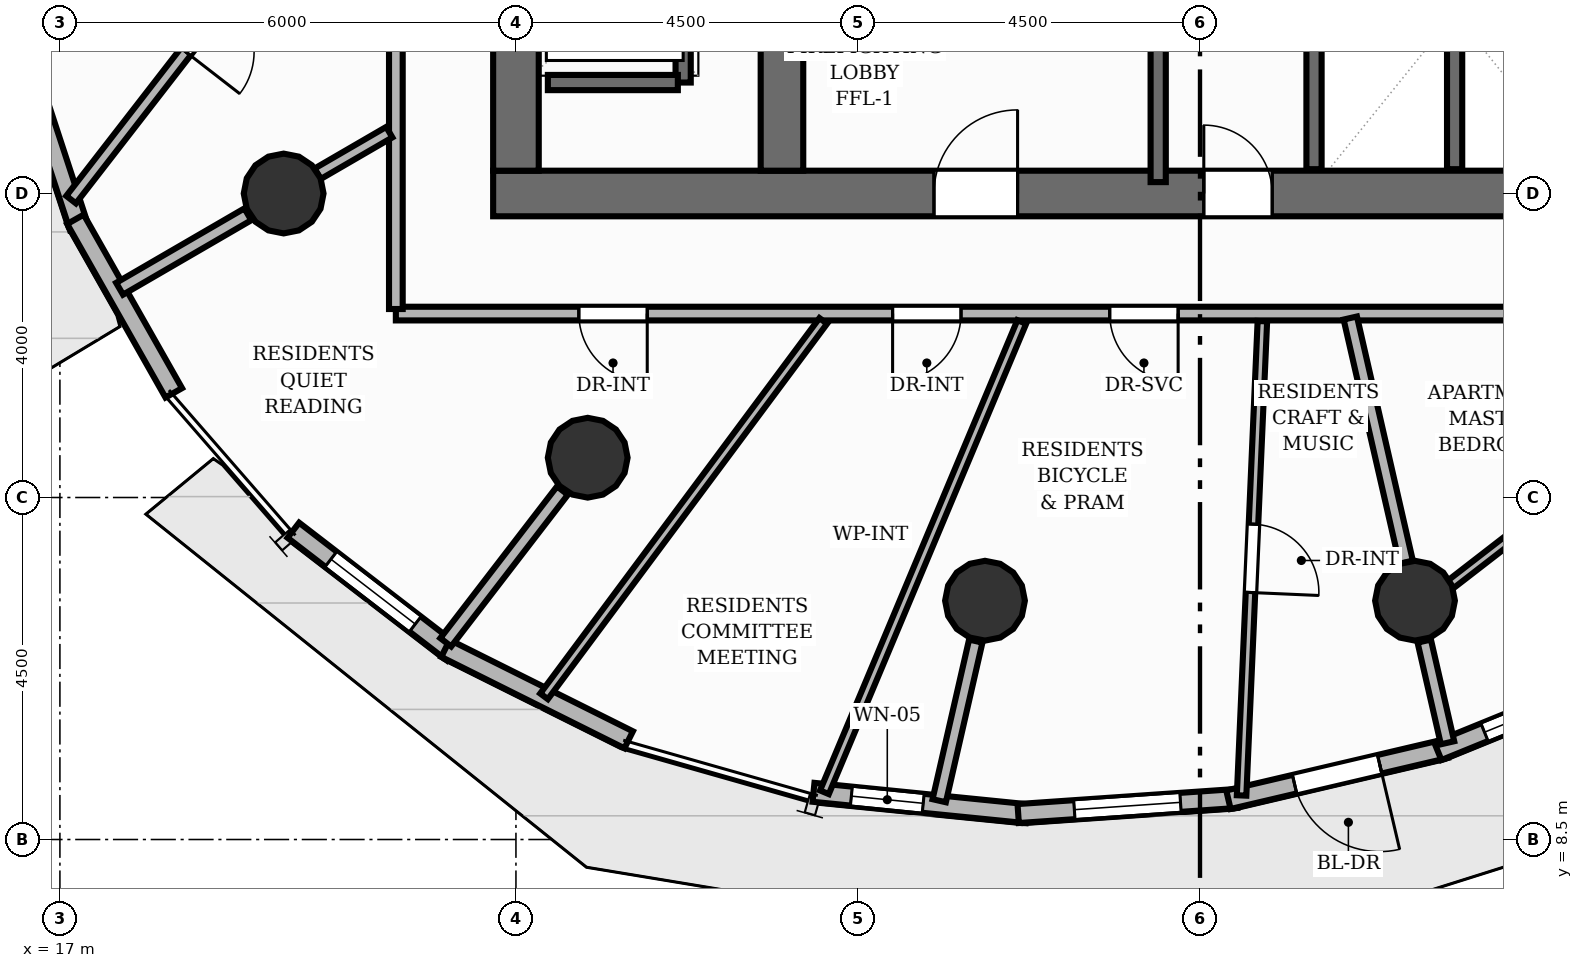
"""IFC4 building model, lengths in metres.
Left out: names, types, materials, properties, quantities, classifications, styles, units other than length and angle.
Written with IfcOpenShell. Run it as: python <this file> out.ifc"""

import sys

from ifc_helpers import new_model, si_unit, direction, frame, frame_2d, origin, origin_2d, place, context, subcontext, project, spatial, rectangle, circle, extrude, element, fill, save


model = new_model("IFC4")
c1 = context("Model", 3, precision=1e-05, world=origin(), true_north=direction((0.0, 1.0)))
c2 = subcontext(c1, "Body", "Model", "MODEL_VIEW")
j1 = project(units=[si_unit("LENGTHUNIT", "METRE"), si_unit("PLANEANGLEUNIT", "RADIAN")], contexts=[c1])
p1 = place(None, origin())
s1 = spatial("IfcSite", under=j1, at=p1, CompositionType="ELEMENT")
p2 = place(p1, origin())
s2 = spatial("IfcBuilding", under=s1, at=p2, CompositionType="ELEMENT")
p3 = place(p2, frame((0.0, 0.0, 145.76)))
s3 = spatial("IfcBuildingStorey", under=s2, at=p3, CompositionType="ELEMENT", Elevation=145.76)
p4 = place(p3, frame((22.7, 17.0, 0.0), z_axis=(0.0, 0.0, 1.0), x_axis=(1.0, 0.0, 0.0)))
e1 = element("IfcWall", 1, at=p4, inside=s3, PredefinedType="SHEAR", context=c2, shape_type="SweptSolid", body=[
    extrude(rectangle(XDim=15.1, YDim=0.6, at=frame_2d((7.55, 0.0))), origin(), (0.0, 0.0, 1.0), 3.2),
])
p5 = place(p4, frame((5.8, 0.0, 0.0)))
e2 = element("IfcOpeningElement", 2, at=p5, cuts=e1, PredefinedType="OPENING", context=c2, shape_type="SweptSolid", body=[
    extrude(rectangle(XDim=1.1, YDim=2.15, at=frame_2d((0.55, 1.075))), frame((0.0, 0.31, 0.0), z_axis=(0.0, -1.0, 0.0), x_axis=(1.0, 0.0, 0.0)), (0.0, 0.0, 1.0), 0.62),
])
p6 = place(p4, frame((9.35, 0.0, 0.0)))
e3 = element("IfcOpeningElement", 3, at=p6, cuts=e1, PredefinedType="OPENING", context=c2, shape_type="SweptSolid", body=[
    extrude(rectangle(XDim=0.9, YDim=2.1, at=frame_2d((0.45, 1.05))), frame((0.0, 0.31, 0.0), z_axis=(0.0, -1.0, 0.0), x_axis=(1.0, 0.0, 0.0)), (0.0, 0.0, 1.0), 0.62),
])
p7 = place(p3, frame((23.0, 17.3, 0.0), z_axis=(0.0, 0.0, 1.0), x_axis=(0.0, 1.0, 0.0)))
e4 = element("IfcWall", 4, at=p7, inside=s3, PredefinedType="SHEAR", context=c2, shape_type="SweptSolid", body=[
    extrude(rectangle(XDim=13.4, YDim=0.6, at=frame_2d((6.7, 0.0))), origin(), (0.0, 0.0, 1.0), 3.2),
])
p8 = place(p7, frame((1.675, 0.0, 0.0)))
e5 = element("IfcOpeningElement", 5, at=p8, cuts=e4, PredefinedType="OPENING", context=c2, shape_type="SweptSolid", body=[
    extrude(rectangle(XDim=1.05, YDim=2.15, at=frame_2d((0.525, 1.075))), frame((0.0, 0.31, 0.0), z_axis=(0.0, -1.0, 0.0), x_axis=(1.0, 0.0, 0.0)), (0.0, 0.0, 1.0), 0.62),
])
p9 = place(p7, frame((6.175, 0.0, 0.0)))
e6 = element("IfcOpeningElement", 6, at=p9, cuts=e4, PredefinedType="OPENING", context=c2, shape_type="SweptSolid", body=[
    extrude(rectangle(XDim=1.05, YDim=2.15, at=frame_2d((0.525, 1.075))), frame((0.0, 0.31, 0.0), z_axis=(0.0, -1.0, 0.0), x_axis=(1.0, 0.0, 0.0)), (0.0, 0.0, 1.0), 0.62),
])
p10 = place(p7, frame((10.675, 0.0, 0.0)))
e7 = element("IfcOpeningElement", 7, at=p10, cuts=e4, PredefinedType="OPENING", context=c2, shape_type="SweptSolid", body=[
    extrude(rectangle(XDim=1.05, YDim=2.15, at=frame_2d((0.525, 1.075))), frame((0.0, 0.31, 0.0), z_axis=(0.0, -1.0, 0.0), x_axis=(1.0, 0.0, 0.0)), (0.0, 0.0, 1.0), 0.62),
])
p11 = place(p3, frame((26.5, 17.3, 0.0), z_axis=(0.0, 0.0, 1.0), x_axis=(0.0, 1.0, 0.0)))
e8 = element("IfcWall", 8, at=p11, inside=s3, PredefinedType="SHEAR", context=c2, shape_type="SweptSolid", body=[
    extrude(rectangle(XDim=13.4, YDim=0.56, at=frame_2d((6.7, 0.0))), origin(), (0.0, 0.0, 1.0), 3.2),
])
for number, where, z_axis, x_axis in (
    (9, (19.944, 17.0, 0.0), (0.0, 0.0, 1.0), (1.0, 0.0, 0.0)),
    (10, (23.944, 13.523, 0.0), (0.0, 0.0, 1.0), (1.0, 0.0, 0.0)),
    (11, (29.171, 11.642, 0.0), (0.0, 0.0, 1.0), (1.0, 0.0, 0.0)),
    (12, (34.829, 11.642, 0.0), (0.0, 0.0, 1.0), (1.0, 0.0, 0.0)),
):
    element("IfcColumn", number, at=place(p3, frame(where, z_axis=z_axis, x_axis=x_axis)), inside=s3, PredefinedType="COLUMN", context=c2, shape_type="SweptSolid", body=[
        extrude(circle(Radius=0.525, at=origin_2d()), origin(), (0.0, 0.0, 1.0), 3.2),
    ])
p12 = place(p3, frame((17.251, 16.556, 0.0), z_axis=(0.0, 0.0, 1.0), x_axis=(-0.311522010952, 0.950238936633, 0.0)))
e13 = element("IfcWall", 13, at=p12, inside=s3, PredefinedType="SOLIDWALL", context=c2, shape_type="SweptSolid", body=[
    extrude(rectangle(XDim=2.648, YDim=0.25, at=frame_2d((1.324, 0.0))), origin(), (0.0, 0.0, 1.0), 2.96),
])
p13 = place(p3, frame((18.498, 14.377, 0.0), z_axis=(0.0, 0.0, 1.0), x_axis=(-0.492909281161, 0.870080709214, 0.0)))
e14 = element("IfcWall", 14, at=p13, inside=s3, PredefinedType="SOLIDWALL", context=c2, shape_type="SweptSolid", body=[
    extrude(rectangle(XDim=2.624, YDim=0.25, at=frame_2d((1.312, 0.0))), origin(), (0.0, 0.0, 1.0), 2.96),
])
p14 = place(p3, frame((22.169, 10.954, 0.0), z_axis=(0.0, 0.0, 1.0), x_axis=(-0.7923805969, 0.610027040103, 0.0)))
e15 = element("IfcWall", 15, at=p14, inside=s3, PredefinedType="SOLIDWALL", context=c2, shape_type="SweptSolid", body=[
    extrude(rectangle(XDim=2.648, YDim=0.25, at=frame_2d((1.324, 0.0))), origin(), (0.0, 0.0, 1.0), 2.96),
])
p15 = place(p14, frame((0.624, 0.0, 0.85)))
e16 = element("IfcOpeningElement", 16, at=p15, cuts=e15, PredefinedType="OPENING", context=c2, shape_type="SweptSolid", body=[
    extrude(rectangle(XDim=1.4, YDim=1.55, at=frame_2d((0.7, 0.775))), frame((0.0, 0.135, 0.0), z_axis=(0.0, -1.0, 0.0), x_axis=(1.0, 0.0, 0.0)), (0.0, 0.0, 1.0), 0.27),
])
p16 = place(p3, frame((24.483, 9.812, 0.0), z_axis=(0.0, 0.0, 1.0), x_axis=(-0.894843809708, 0.446379385979, 0.0)))
e17 = element("IfcWall", 17, at=p16, inside=s3, PredefinedType="SOLIDWALL", context=c2, shape_type="SweptSolid", body=[
    extrude(rectangle(XDim=2.693, YDim=0.25, at=frame_2d((1.347, 0.0))), origin(), (0.0, 0.0, 1.0), 2.96),
])
p17 = place(p3, frame((29.719, 8.84, 0.0), z_axis=(0.0, 0.0, 1.0), x_axis=(-0.995013999105, 0.099735357744, 0.0)))
e18 = element("IfcWall", 18, at=p17, inside=s3, PredefinedType="SOLIDWALL", context=c2, shape_type="SweptSolid", body=[
    extrude(rectangle(XDim=2.818, YDim=0.25, at=frame_2d((1.409, 0.0))), origin(), (0.0, 0.0, 1.0), 2.96),
])
p18 = place(p17, frame((1.367, 0.0, 0.85)))
e19 = element("IfcOpeningElement", 19, at=p18, cuts=e18, PredefinedType="OPENING", context=c2, shape_type="SweptSolid", body=[
    extrude(rectangle(XDim=0.95, YDim=1.45, at=frame_2d((0.475, 0.725))), frame((0.0, 0.135, 0.0), z_axis=(0.0, -1.0, 0.0), x_axis=(1.0, 0.0, 0.0)), (0.0, 0.0, 1.0), 0.27),
])
p19 = place(p3, frame((32.483, 9.04, 0.0), z_axis=(0.0, 0.0, 1.0), x_axis=(-0.997630729469, -0.068796276206, 0.0)))
e20 = element("IfcWall", 20, at=p19, inside=s3, PredefinedType="SOLIDWALL", context=c2, shape_type="SweptSolid", body=[
    extrude(rectangle(XDim=2.882, YDim=0.25, at=frame_2d((1.441, 0.0))), origin(), (0.0, 0.0, 1.0), 2.96),
])
p20 = place(p19, frame((0.741, 0.0, 0.85)))
e21 = element("IfcOpeningElement", 21, at=p20, cuts=e20, PredefinedType="OPENING", context=c2, shape_type="SweptSolid", body=[
    extrude(rectangle(XDim=1.4, YDim=1.55, at=frame_2d((0.7, 0.775))), frame((0.0, 0.135, 0.0), z_axis=(0.0, -1.0, 0.0), x_axis=(1.0, 0.0, 0.0)), (0.0, 0.0, 1.0), 0.27),
])
p21 = place(p3, frame((35.233, 9.695, 0.0), z_axis=(0.0, 0.0, 1.0), x_axis=(-0.973538048261, -0.228524984602, 0.0)))
e22 = element("IfcWall", 22, at=p21, inside=s3, PredefinedType="SOLIDWALL", context=c2, shape_type="SweptSolid", body=[
    extrude(rectangle(XDim=2.937, YDim=0.25, at=frame_2d((1.468, 0.0))), origin(), (0.0, 0.0, 1.0), 2.96),
])
p22 = place(p21, frame((0.893, 0.0, 0.0)))
e23 = element("IfcOpeningElement", 23, at=p22, cuts=e22, PredefinedType="OPENING", context=c2, shape_type="SweptSolid", body=[
    extrude(rectangle(XDim=1.15, YDim=2.2, at=frame_2d((0.575, 1.1))), frame((0.0, 0.135, 0.0), z_axis=(0.0, -1.0, 0.0), x_axis=(1.0, 0.0, 0.0)), (0.0, 0.0, 1.0), 0.27),
])
p23 = place(p3, frame((37.886, 10.785, 0.0), z_axis=(0.0, 0.0, 1.0), x_axis=(-0.926076439021, -0.377335963154, 0.0)))
e24 = element("IfcWall", 24, at=p23, inside=s3, PredefinedType="SOLIDWALL", context=c2, shape_type="SweptSolid", body=[
    extrude(rectangle(XDim=2.977, YDim=0.25, at=frame_2d((1.488, 0.0))), origin(), (0.0, 0.0, 1.0), 2.96),
])
p24 = place(p23, frame((0.664, 0.0, 0.85)))
e25 = element("IfcOpeningElement", 25, at=p24, cuts=e24, PredefinedType="OPENING", context=c2, shape_type="SweptSolid", body=[
    extrude(rectangle(XDim=1.65, YDim=1.55, at=frame_2d((0.825, 0.775))), frame((0.0, 0.135, 0.0), z_axis=(0.0, -1.0, 0.0), x_axis=(1.0, 0.0, 0.0)), (0.0, 0.0, 1.0), 0.27),
])
p25 = place(p3, frame((31.45, 17.15, 0.0), z_axis=(0.0, 0.0, 1.0), x_axis=(0.0, 1.0, 0.0)))
e26 = element("IfcWall", 26, at=p25, inside=s3, PredefinedType="SHEAR", context=c2, shape_type="SweptSolid", body=[
    extrude(rectangle(XDim=3.5, YDim=0.2, at=frame_2d((1.75, 0.0))), origin(), (0.0, 0.0, 1.0), 3.2),
])
p26 = place(p3, frame((25.2, 18.46, 0.0), z_axis=(0.0, 0.0, 1.0), x_axis=(0.0, 1.0, 0.0)))
e27 = element("IfcWall", 27, at=p26, inside=s3, PredefinedType="SHEAR", context=c2, shape_type="SweptSolid", body=[
    extrude(rectangle(XDim=11.08, YDim=0.2, at=frame_2d((5.54, 0.0))), origin(), (0.0, 0.0, 1.0), 3.2),
])
p27 = place(p3, frame((23.42, 18.46, 0.0), z_axis=(0.0, 0.0, 1.0), x_axis=(1.0, 0.0, 0.0)))
e28 = element("IfcWall", 28, at=p27, inside=s3, PredefinedType="SHEAR", context=c2, shape_type="SweptSolid", body=[
    extrude(rectangle(XDim=1.71, YDim=0.2, at=frame_2d((0.855, 0.0))), origin(), (0.0, 0.0, 1.0), 3.2),
])
for number, where, z_axis, x_axis in (
    (29, (33.5, 17.32, 0.0), (0.0, 0.0, 1.0), (0.0, 1.0, 0.0)),
    (30, (35.35, 17.32, 0.0), (0.0, 0.0, 1.0), (0.0, 1.0, 0.0)),
):
    element("IfcWall", number, at=place(p3, frame(where, z_axis=z_axis, x_axis=x_axis)), inside=s3, PredefinedType="SHEAR", context=c2, shape_type="SweptSolid", body=[
        extrude(rectangle(XDim=1.86, YDim=0.2, at=frame_2d((0.93, 0.0))), origin(), (0.0, 0.0, 1.0), 3.2),
    ])
p28 = place(p3, frame((19.472, 16.726, 0.0), z_axis=(0.0, 0.0, 1.0), x_axis=(-0.864802971131, -0.502111363268, 0.0)))
e31 = element("IfcWall", 31, at=p28, inside=s3, PredefinedType="PARTITIONING", context=c2, shape_type="SweptSolid", body=[
    extrude(rectangle(XDim=1.951, YDim=0.18, at=frame_2d((0.975, 0.0))), origin(), (0.0, 0.0, 1.0), 2.336),
])
p29 = place(p3, frame((23.612, 13.092, 0.0), z_axis=(0.0, 0.0, 1.0), x_axis=(-0.609556175004, -0.792742877303, 0.0)))
e32 = element("IfcWall", 32, at=p29, inside=s3, PredefinedType="PARTITIONING", context=c2, shape_type="SweptSolid", body=[
    extrude(rectangle(XDim=2.519, YDim=0.18, at=frame_2d((1.259, 0.0))), origin(), (0.0, 0.0, 1.0), 2.336),
])
p30 = place(p3, frame((29.05, 11.111, 0.0), z_axis=(0.0, 0.0, 1.0), x_axis=(-0.223080127706, -0.974800111111, 0.0)))
e33 = element("IfcWall", 33, at=p30, inside=s3, PredefinedType="PARTITIONING", context=c2, shape_type="SweptSolid", body=[
    extrude(rectangle(XDim=2.155, YDim=0.18, at=frame_2d((1.077, 0.0))), origin(), (0.0, 0.0, 1.0), 2.336),
])
p31 = place(p3, frame((34.95, 11.111, 0.0), z_axis=(0.0, 0.0, 1.0), x_axis=(0.223027623572, -0.974812125039, 0.0)))
e34 = element("IfcWall", 34, at=p31, inside=s3, PredefinedType="PARTITIONING", context=c2, shape_type="SweptSolid", body=[
    extrude(rectangle(XDim=1.373, YDim=0.18, at=frame_2d((0.687, 0.0))), origin(), (0.0, 0.0, 1.0), 2.336),
])
p32 = place(p3, frame((39.08, 15.42, 0.0), z_axis=(0.0, 0.0, 1.0), x_axis=(-1.0, 0.0, 0.0)))
e35 = element("IfcWall", 35, at=p32, inside=s3, PredefinedType="PARTITIONING", context=c2, shape_type="SweptSolid", body=[
    extrude(rectangle(XDim=17.66, YDim=0.18, at=frame_2d((8.83, 0.0))), origin(), (0.0, 0.0, 1.0), 2.955),
])
p33 = place(p32, frame((7.368, 0.0, 0.0)))
e36 = element("IfcOpeningElement", 36, at=p33, cuts=e35, PredefinedType="OPENING", context=c2, shape_type="SweptSolid", body=[
    extrude(rectangle(XDim=0.9, YDim=2.1, at=frame_2d((0.45, 1.05))), frame((0.0, 0.1, 0.0), z_axis=(0.0, -1.0, 0.0), x_axis=(1.0, 0.0, 0.0)), (0.0, 0.0, 1.0), 0.2),
])
p34 = place(p32, frame((10.224, 0.0, 0.0)))
e37 = element("IfcOpeningElement", 37, at=p34, cuts=e35, PredefinedType="OPENING", context=c2, shape_type="SweptSolid", body=[
    extrude(rectangle(XDim=0.9, YDim=2.1, at=frame_2d((0.45, 1.05))), frame((0.0, 0.1, 0.0), z_axis=(0.0, -1.0, 0.0), x_axis=(1.0, 0.0, 0.0)), (0.0, 0.0, 1.0), 0.2),
])
p35 = place(p32, frame((14.353, 0.0, 0.0)))
e38 = element("IfcOpeningElement", 38, at=p35, cuts=e35, PredefinedType="OPENING", context=c2, shape_type="SweptSolid", body=[
    extrude(rectangle(XDim=0.9, YDim=2.1, at=frame_2d((0.45, 1.05))), frame((0.0, 0.1, 0.0), z_axis=(0.0, -1.0, 0.0), x_axis=(1.0, 0.0, 0.0)), (0.0, 0.0, 1.0), 0.2),
])
p36 = place(p3, frame((21.42, 15.48, 0.0), z_axis=(0.0, 0.0, 1.0), x_axis=(0.0, 1.0, 0.0)))
e39 = element("IfcWall", 39, at=p36, inside=s3, PredefinedType="PARTITIONING", context=c2, shape_type="SweptSolid", body=[
    extrude(rectangle(XDim=6.12, YDim=0.18, at=frame_2d((3.06, 0.0))), origin(), (0.0, 0.0, 1.0), 2.955),
])
p37 = place(p3, frame((27.059, 9.122, 0.0), z_axis=(0.0, 0.0, 1.0), x_axis=(0.386926287161, 0.922110648623, 0.0)))
e40 = element("IfcWall", 40, at=p37, inside=s3, PredefinedType="PARTITIONING", context=c2, shape_type="SweptSolid", body=[
    extrude(rectangle(XDim=6.71, YDim=0.125, at=frame_2d((3.355, 0.0))), origin(), (0.0, 0.0, 1.0), 2.955),
])
p38 = place(p3, frame((32.821, 15.32, 0.0), z_axis=(0.0, 0.0, 1.0), x_axis=(-0.043813760095, -0.999039716141, 0.0)))
e41 = element("IfcWall", 41, at=p38, inside=s3, PredefinedType="PARTITIONING", context=c2, shape_type="SweptSolid", body=[
    extrude(rectangle(XDim=6.247, YDim=0.125, at=frame_2d((3.123, 0.0))), origin(), (0.0, 0.0, 1.0), 2.692),
])
p39 = place(p38, frame((2.673, 0.0, 0.0)))
e42 = element("IfcOpeningElement", 42, at=p39, cuts=e41, PredefinedType="OPENING", context=c2, shape_type="SweptSolid", body=[
    extrude(rectangle(XDim=0.9, YDim=2.1, at=frame_2d((0.45, 1.05))), frame((0.0, 0.073, 0.0), z_axis=(0.0, -1.0, 0.0), x_axis=(1.0, 0.0, 0.0)), (0.0, 0.0, 1.0), 0.145),
])
p40 = place(p3, frame((23.37, 10.384, 0.0), z_axis=(0.0, 0.0, 1.0), x_axis=(0.596726995384, 0.802444323913, 0.0)))
e43 = element("IfcWall", 43, at=p40, inside=s3, PredefinedType="PARTITIONING", context=c2, shape_type="SweptSolid", body=[
    extrude(rectangle(XDim=6.156, YDim=0.125, at=frame_2d((3.078, 0.0))), origin(), (0.0, 0.0, 1.0), 2.692),
])
p41 = place(p3, frame((20.391, 17.26, 0.0), z_axis=(0.0, 0.0, 1.0), x_axis=(0.864719901707, 0.50225440923, 0.0)))
e44 = element("IfcWall", 44, at=p41, inside=s3, PredefinedType="PLUMBINGWALL", context=c2, shape_type="SweptSolid", body=[
    extrude(rectangle(XDim=1.09, YDim=0.16, at=frame_2d((0.545, 0.0))), origin(), (0.0, 0.0, 1.0), 2.336),
])
p42 = place(p3, frame((33.977, 15.362, 0.0), z_axis=(0.0, 0.0, 1.0), x_axis=(0.22319287001, -0.974774303506, 0.0)))
e45 = element("IfcWall", 45, at=p42, inside=s3, PredefinedType="PARTITIONING", context=c2, shape_type="SweptSolid", body=[
    extrude(rectangle(XDim=3.296, YDim=0.18, at=frame_2d((1.648, 0.0))), origin(), (0.0, 0.0, 1.0), 2.336),
])
p43 = place(p3, frame((43.184, 17.96, 0.0), z_axis=(0.0, 0.0, 1.0), x_axis=(-0.790862802872, -0.611993486104, 0.0)))
e46 = element("IfcWall", 46, at=p43, inside=s3, PredefinedType="PARTITIONING", context=c2, shape_type="SweptSolid", body=[
    extrude(rectangle(XDim=9.975, YDim=0.125, at=frame_2d((4.987, 0.0))), origin(), (0.0, 0.0, 1.0), 2.411),
])
p44 = place(p43, frame((3.417, 0.0, 0.0)))
e47 = element("IfcOpeningElement", 47, at=p44, cuts=e46, PredefinedType="OPENING", context=c2, shape_type="SweptSolid", body=[
    extrude(rectangle(XDim=0.9, YDim=2.1, at=frame_2d((0.45, 1.05))), frame((0.0, 0.073, 0.0), z_axis=(0.0, -1.0, 0.0), x_axis=(1.0, 0.0, 0.0)), (0.0, 0.0, 1.0), 0.145),
])
p45 = place(p3, frame((20.714, 21.521, 0.0), z_axis=(0.0, 0.0, 1.0), x_axis=(-0.612572320399, -0.790414544578, 0.0)))
e48 = element("IfcWall", 48, at=p45, inside=s3, PredefinedType="PLUMBINGWALL", context=c2, shape_type="SweptSolid", body=[
    extrude(rectangle(XDim=5.822, YDim=0.16, at=frame_2d((2.911, 0.0))), origin(), (0.0, 0.0, 1.0), 2.955),
])
p46 = place(p45, frame((2.461, 0.0, 0.0)))
e49 = element("IfcOpeningElement", 49, at=p46, cuts=e48, PredefinedType="OPENING", context=c2, shape_type="SweptSolid", body=[
    extrude(rectangle(XDim=0.9, YDim=2.1, at=frame_2d((0.45, 1.05))), frame((0.0, 0.09, 0.0), z_axis=(0.0, -1.0, 0.0), x_axis=(1.0, 0.0, 0.0)), (0.0, 0.0, 1.0), 0.18),
])
p47 = place(p22, origin())
e50 = element("IfcDoor", 50, at=p47, inside=s3, OperationType="SINGLE_SWING_LEFT", PredefinedType="DOOR", context=c2, shape_type="SweptSolid", body=[
    extrude(rectangle(XDim=1.15, YDim=2.2, at=frame_2d((0.575, 1.1))), frame((0.0, 0.025, 0.0), z_axis=(0.0, -1.0, 0.0), x_axis=(1.0, 0.0, 0.0)), (0.0, 0.0, 1.0), 0.05),
])
fill(e23, e50)
p48 = place(p15, origin())
e51 = element("IfcWindow", 51, at=p48, inside=s3, PartitioningType="SINGLE_PANEL", PredefinedType="WINDOW", context=c2, shape_type="SweptSolid", body=[
    extrude(rectangle(XDim=1.4, YDim=1.55, at=frame_2d((0.7, 0.775))), frame((0.0, 0.03, 0.0), z_axis=(0.0, -1.0, 0.0), x_axis=(1.0, 0.0, 0.0)), (0.0, 0.0, 1.0), 0.06),
])
fill(e16, e51)
p49 = place(p18, origin())
e52 = element("IfcWindow", 52, at=p49, inside=s3, PartitioningType="SINGLE_PANEL", PredefinedType="WINDOW", context=c2, shape_type="SweptSolid", body=[
    extrude(rectangle(XDim=0.95, YDim=1.45, at=frame_2d((0.475, 0.725))), frame((0.0, 0.03, 0.0), z_axis=(0.0, -1.0, 0.0), x_axis=(1.0, 0.0, 0.0)), (0.0, 0.0, 1.0), 0.06),
])
fill(e19, e52)
p50 = place(p20, origin())
e53 = element("IfcWindow", 53, at=p50, inside=s3, PartitioningType="SINGLE_PANEL", PredefinedType="WINDOW", context=c2, shape_type="SweptSolid", body=[
    extrude(rectangle(XDim=1.4, YDim=1.55, at=frame_2d((0.7, 0.775))), frame((0.0, 0.03, 0.0), z_axis=(0.0, -1.0, 0.0), x_axis=(1.0, 0.0, 0.0)), (0.0, 0.0, 1.0), 0.06),
])
fill(e21, e53)
p51 = place(p24, origin())
e54 = element("IfcWindow", 54, at=p51, inside=s3, PartitioningType="SINGLE_PANEL", PredefinedType="WINDOW", context=c2, shape_type="SweptSolid", body=[
    extrude(rectangle(XDim=1.65, YDim=1.55, at=frame_2d((0.825, 0.775))), frame((0.0, 0.03, 0.0), z_axis=(0.0, -1.0, 0.0), x_axis=(1.0, 0.0, 0.0)), (0.0, 0.0, 1.0), 0.06),
])
fill(e25, e54)
p52 = place(p5, origin())
e55 = element("IfcDoor", 55, at=p52, inside=s3, OperationType="SINGLE_SWING_RIGHT", PredefinedType="DOOR", context=c2, shape_type="SweptSolid", body=[
    extrude(rectangle(XDim=1.1, YDim=2.15, at=frame_2d((0.55, 1.075))), frame((0.0, 0.025, 0.0), z_axis=(0.0, -1.0, 0.0), x_axis=(1.0, 0.0, 0.0)), (0.0, 0.0, 1.0), 0.05),
])
fill(e2, e55)
p53 = place(p6, origin())
e56 = element("IfcDoor", 56, at=p53, inside=s3, OperationType="SINGLE_SWING_LEFT", PredefinedType="DOOR", context=c2, shape_type="SweptSolid", body=[
    extrude(rectangle(XDim=0.9, YDim=2.1, at=frame_2d((0.45, 1.05))), frame((0.0, 0.025, 0.0), z_axis=(0.0, -1.0, 0.0), x_axis=(1.0, 0.0, 0.0)), (0.0, 0.0, 1.0), 0.05),
])
fill(e3, e56)
p54 = place(p33, origin())
e57 = element("IfcDoor", 57, at=p54, inside=s3, OperationType="SINGLE_SWING_LEFT", PredefinedType="DOOR", context=c2, shape_type="SweptSolid", body=[
    extrude(rectangle(XDim=0.9, YDim=2.1, at=frame_2d((0.45, 1.05))), frame((0.0, 0.025, 0.0), z_axis=(0.0, -1.0, 0.0), x_axis=(1.0, 0.0, 0.0)), (0.0, 0.0, 1.0), 0.05),
])
fill(e36, e57)
p55 = place(p34, origin())
e58 = element("IfcDoor", 58, at=p55, inside=s3, OperationType="SINGLE_SWING_RIGHT", PredefinedType="DOOR", context=c2, shape_type="SweptSolid", body=[
    extrude(rectangle(XDim=0.9, YDim=2.1, at=frame_2d((0.45, 1.05))), frame((0.0, 0.025, 0.0), z_axis=(0.0, -1.0, 0.0), x_axis=(1.0, 0.0, 0.0)), (0.0, 0.0, 1.0), 0.05),
])
fill(e37, e58)
p56 = place(p35, origin())
e59 = element("IfcDoor", 59, at=p56, inside=s3, OperationType="SINGLE_SWING_LEFT", PredefinedType="DOOR", context=c2, shape_type="SweptSolid", body=[
    extrude(rectangle(XDim=0.9, YDim=2.1, at=frame_2d((0.45, 1.05))), frame((0.0, 0.025, 0.0), z_axis=(0.0, -1.0, 0.0), x_axis=(1.0, 0.0, 0.0)), (0.0, 0.0, 1.0), 0.05),
])
fill(e38, e59)
p57 = place(p39, origin())
e60 = element("IfcDoor", 60, at=p57, inside=s3, OperationType="SINGLE_SWING_RIGHT", PredefinedType="DOOR", context=c2, shape_type="SweptSolid", body=[
    extrude(rectangle(XDim=0.9, YDim=2.1, at=frame_2d((0.45, 1.05))), frame((0.0, 0.025, 0.0), z_axis=(0.0, -1.0, 0.0), x_axis=(1.0, 0.0, 0.0)), (0.0, 0.0, 1.0), 0.05),
])
fill(e42, e60)
p58 = place(p46, origin())
e61 = element("IfcDoor", 61, at=p58, inside=s3, OperationType="SINGLE_SWING_RIGHT", PredefinedType="DOOR", context=c2, shape_type="SweptSolid", body=[
    extrude(rectangle(XDim=0.9, YDim=2.1, at=frame_2d((0.45, 1.05))), frame((0.0, 0.025, 0.0), z_axis=(0.0, -1.0, 0.0), x_axis=(1.0, 0.0, 0.0)), (0.0, 0.0, 1.0), 0.05),
])
fill(e49, e61)
save(model, sys.argv[1])
